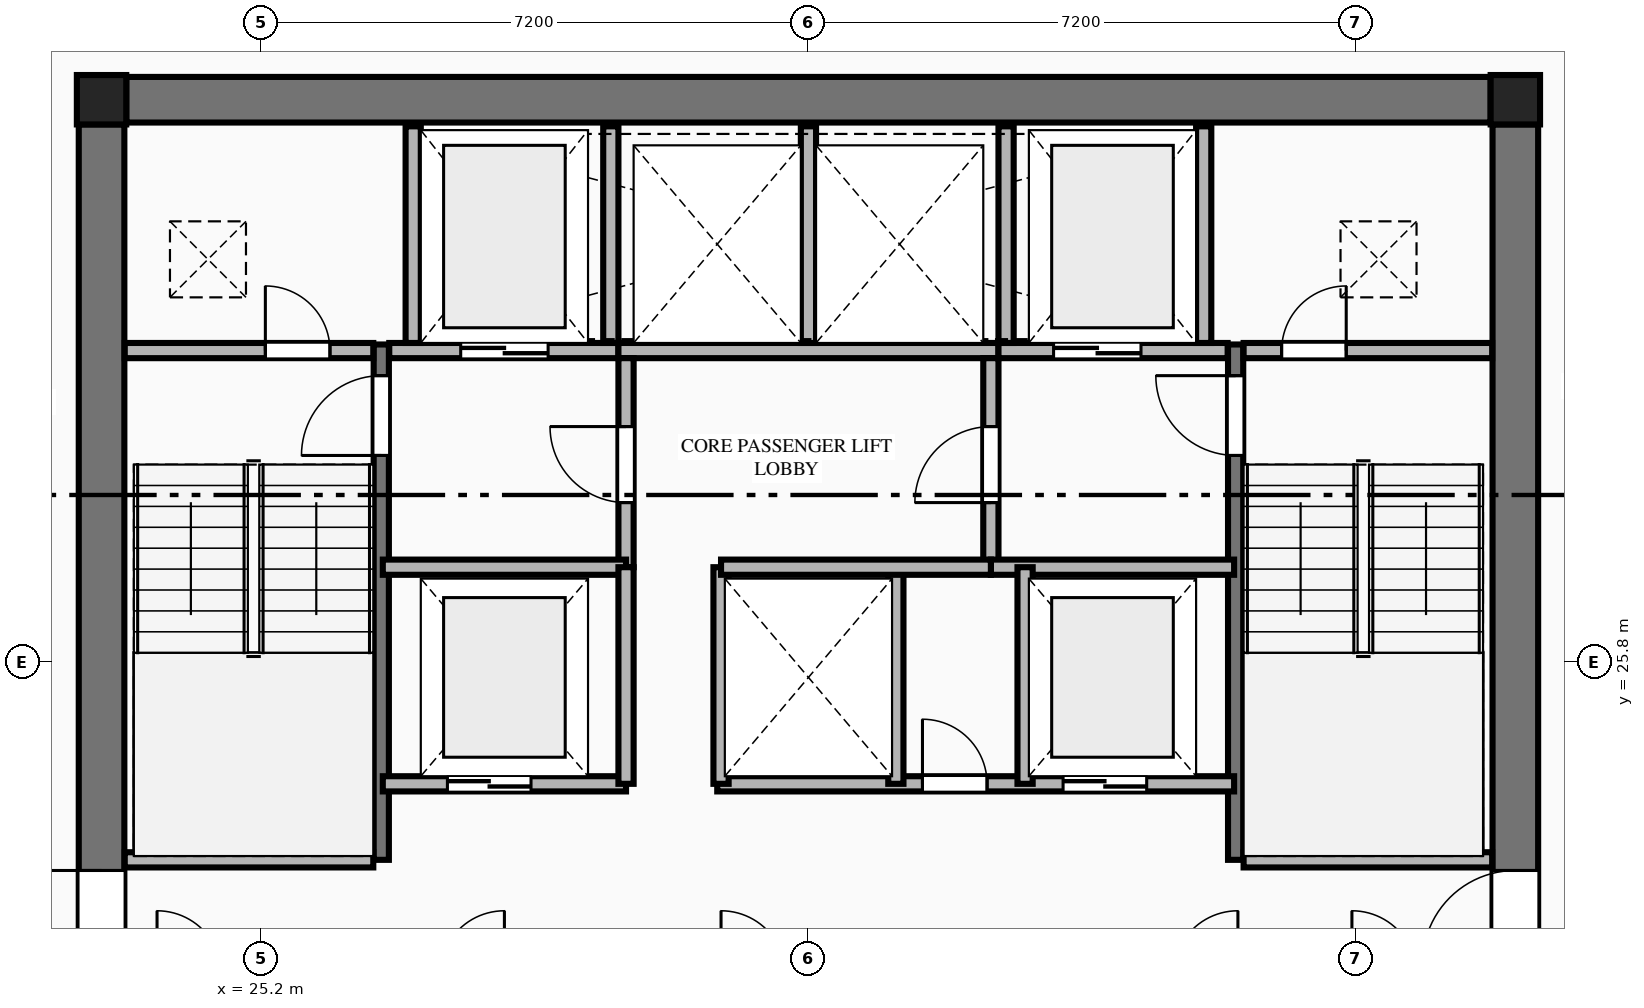
"""IFC4 building model, lengths in metres.
Left out: names, types, materials, properties, quantities, classifications, styles, units other than length and angle.
Written with IfcOpenShell. Run it as: python <this file> out.ifc"""

import sys

from ifc_helpers import new_model, si_unit, direction, frame, frame_2d, origin, origin_2d, place, context, subcontext, project, spatial, rectangle, extrude, element, fill, save


model = new_model("IFC4")
c1 = context("Model", 3, precision=1e-05, world=origin(), true_north=direction((0.0, 1.0)))
c2 = subcontext(c1, "Body", "Model", "MODEL_VIEW")
j1 = project(units=[si_unit("LENGTHUNIT", "METRE"), si_unit("PLANEANGLEUNIT", "RADIAN")], contexts=[c1])
p1 = place(None, origin())
s1 = spatial("IfcSite", under=j1, at=p1, CompositionType="ELEMENT")
p2 = place(p1, origin())
s2 = spatial("IfcBuilding", under=s1, at=p2, CompositionType="ELEMENT")
p3 = place(p2, frame((0.0, 0.0, 164.15)))
s3 = spatial("IfcBuildingStorey", under=s2, at=p3, CompositionType="ELEMENT", Elevation=164.15)
for number, where, z_axis, x_axis in (
    (1, (41.7, 33.2, 0.0), (0.0, 0.0, 1.0), (1.0, 0.0, 0.0)),
    (2, (23.1, 33.2, 0.0), (0.0, 0.0, 1.0), (1.0, 0.0, 0.0)),
):
    element("IfcColumn", number, at=place(p3, frame(where, z_axis=z_axis, x_axis=x_axis)), inside=s3, PredefinedType="COLUMN", context=c2, shape_type="SweptSolid", body=[
        extrude(rectangle(XDim=0.65, YDim=0.65, at=origin_2d()), origin(), (0.0, 0.0, 1.0), 3.55),
    ])
p4 = place(p3, frame((23.425, 33.2, 0.0), z_axis=(0.0, 0.0, 1.0), x_axis=(1.0, 0.0, 0.0)))
e3 = element("IfcWall", 3, at=p4, inside=s3, PredefinedType="SHEAR", context=c2, shape_type="SweptSolid", body=[
    extrude(rectangle(XDim=17.95, YDim=0.6, at=frame_2d((8.975, 0.0))), origin(), (0.0, 0.0, 1.0), 3.34),
])
p5 = place(p3, frame((23.1, 18.925, 0.0), z_axis=(0.0, 0.0, 1.0), x_axis=(0.0, 1.0, 0.0)))
e4 = element("IfcWall", 4, at=p5, inside=s3, PredefinedType="SHEAR", context=c2, shape_type="SweptSolid", body=[
    extrude(rectangle(XDim=13.95, YDim=0.6, at=frame_2d((6.975, 0.0))), origin(), (0.0, 0.0, 1.0), 3.34),
])
p6 = place(p5, frame((2.915, 0.0, 0.0)))
e5 = element("IfcOpeningElement", 5, at=p6, cuts=e4, PredefinedType="OPENING", context=c2, shape_type="SweptSolid", body=[
    extrude(rectangle(XDim=1.22, YDim=2.25, at=frame_2d((0.61, 1.125))), frame((0.0, 0.31, 0.0), z_axis=(0.0, -1.0, 0.0), x_axis=(1.0, 0.0, 0.0)), (0.0, 0.0, 1.0), 0.62),
])
p7 = place(p3, frame((41.7, 18.925, 0.0), z_axis=(0.0, 0.0, 1.0), x_axis=(0.0, 1.0, 0.0)))
e6 = element("IfcWall", 6, at=p7, inside=s3, PredefinedType="SHEAR", context=c2, shape_type="SweptSolid", body=[
    extrude(rectangle(XDim=13.95, YDim=0.6, at=frame_2d((6.975, 0.0))), origin(), (0.0, 0.0, 1.0), 3.34),
])
p8 = place(p7, frame((2.915, 0.0, 0.0)))
e7 = element("IfcOpeningElement", 7, at=p8, cuts=e6, PredefinedType="OPENING", context=c2, shape_type="SweptSolid", body=[
    extrude(rectangle(XDim=1.22, YDim=2.25, at=frame_2d((0.61, 1.125))), frame((0.0, 0.31, 0.0), z_axis=(0.0, -1.0, 0.0), x_axis=(1.0, 0.0, 0.0)), (0.0, 0.0, 1.0), 0.62),
])
p9 = place(p3, frame((26.78, 23.2, 0.0), z_axis=(0.0, 0.0, 1.0), x_axis=(0.0, 1.0, 0.0)))
e8 = element("IfcWall", 8, at=p9, inside=s3, PredefinedType="SHEAR", context=c2, shape_type="SweptSolid", body=[
    extrude(rectangle(XDim=6.78, YDim=0.2, at=frame_2d((3.39, 0.0))), origin(), (0.0, 0.0, 1.0), 3.55),
])
p10 = place(p9, frame((5.32, 0.0, 0.0)))
e9 = element("IfcOpeningElement", 9, at=p10, cuts=e8, PredefinedType="OPENING", context=c2, shape_type="SweptSolid", body=[
    extrude(rectangle(XDim=1.05, YDim=2.15, at=frame_2d((0.525, 1.075))), frame((0.0, 0.11, 0.0), z_axis=(0.0, -1.0, 0.0), x_axis=(1.0, 0.0, 0.0)), (0.0, 0.0, 1.0), 0.22),
])
p11 = place(p3, frame((23.405, 23.2, 0.0), z_axis=(0.0, 0.0, 1.0), x_axis=(1.0, 0.0, 0.0)))
e10 = element("IfcWall", 10, at=p11, inside=s3, PredefinedType="PLUMBINGWALL", context=c2, shape_type="SweptSolid", body=[
    extrude(rectangle(XDim=3.27, YDim=0.2, at=frame_2d((1.635, 0.0))), origin(), (0.0, 0.0, 1.0), 3.34),
])
p12 = place(p3, frame((38.02, 23.2, 0.0), z_axis=(0.0, 0.0, 1.0), x_axis=(0.0, 1.0, 0.0)))
e11 = element("IfcWall", 11, at=p12, inside=s3, PredefinedType="SHEAR", context=c2, shape_type="SweptSolid", body=[
    extrude(rectangle(XDim=6.78, YDim=0.2, at=frame_2d((3.39, 0.0))), origin(), (0.0, 0.0, 1.0), 3.55),
])
p13 = place(p12, frame((5.32, 0.0, 0.0)))
e12 = element("IfcOpeningElement", 12, at=p13, cuts=e11, PredefinedType="OPENING", context=c2, shape_type="SweptSolid", body=[
    extrude(rectangle(XDim=1.05, YDim=2.15, at=frame_2d((0.525, 1.075))), frame((0.0, 0.11, 0.0), z_axis=(0.0, -1.0, 0.0), x_axis=(1.0, 0.0, 0.0)), (0.0, 0.0, 1.0), 0.22),
])
p14 = place(p3, frame((38.125, 23.2, 0.0), z_axis=(0.0, 0.0, 1.0), x_axis=(1.0, 0.0, 0.0)))
e13 = element("IfcWall", 13, at=p14, inside=s3, PredefinedType="PLUMBINGWALL", context=c2, shape_type="SweptSolid", body=[
    extrude(rectangle(XDim=3.27, YDim=0.2, at=frame_2d((1.635, 0.0))), origin(), (0.0, 0.0, 1.0), 3.34),
])
p15 = place(p3, frame((23.405, 29.9, 0.0), z_axis=(0.0, 0.0, 1.0), x_axis=(1.0, 0.0, 0.0)))
e14 = element("IfcWall", 14, at=p15, inside=s3, PredefinedType="PLUMBINGWALL", context=c2, shape_type="SweptSolid", body=[
    extrude(rectangle(XDim=3.27, YDim=0.2, at=frame_2d((1.635, 0.0))), origin(), (0.0, 0.0, 1.0), 3.34),
])
p16 = place(p15, frame((1.85, 0.0, 0.0)))
e15 = element("IfcOpeningElement", 15, at=p16, cuts=e14, PredefinedType="OPENING", context=c2, shape_type="SweptSolid", body=[
    extrude(rectangle(XDim=0.85, YDim=2.05, at=frame_2d((0.425, 1.025))), frame((0.0, 0.11, 0.0), z_axis=(0.0, -1.0, 0.0), x_axis=(1.0, 0.0, 0.0)), (0.0, 0.0, 1.0), 0.22),
])
p17 = place(p3, frame((26.885, 29.9, 0.0), z_axis=(0.0, 0.0, 1.0), x_axis=(1.0, 0.0, 0.0)))
e16 = element("IfcWall", 16, at=p17, inside=s3, PredefinedType="PLUMBINGWALL", context=c2, shape_type="SweptSolid", body=[
    extrude(rectangle(XDim=3.015, YDim=0.2, at=frame_2d((1.507, 0.0))), origin(), (0.0, 0.0, 1.0), 3.34),
])
p18 = place(p17, frame((0.94, 0.0, 0.0)))
e17 = element("IfcOpeningElement", 17, at=p18, cuts=e16, PredefinedType="OPENING", context=c2, shape_type="SweptSolid", body=[
    extrude(rectangle(XDim=1.15, YDim=2.2, at=frame_2d((0.575, 1.1))), frame((0.0, 0.11, 0.0), z_axis=(0.0, -1.0, 0.0), x_axis=(1.0, 0.0, 0.0)), (0.0, 0.0, 1.0), 0.22),
])
p19 = place(p3, frame((29.9, 29.9, 0.0), z_axis=(0.0, 0.0, 1.0), x_axis=(1.0, 0.0, 0.0)))
e18 = element("IfcWall", 18, at=p19, inside=s3, PredefinedType="PLUMBINGWALL", context=c2, shape_type="SweptSolid", body=[
    extrude(rectangle(XDim=5.0, YDim=0.2, at=frame_2d((2.5, 0.0))), origin(), (0.0, 0.0, 1.0), 3.34),
])
p20 = place(p3, frame((34.9, 29.9, 0.0), z_axis=(0.0, 0.0, 1.0), x_axis=(1.0, 0.0, 0.0)))
e19 = element("IfcWall", 19, at=p20, inside=s3, PredefinedType="PLUMBINGWALL", context=c2, shape_type="SweptSolid", body=[
    extrude(rectangle(XDim=3.015, YDim=0.2, at=frame_2d((1.508, 0.0))), origin(), (0.0, 0.0, 1.0), 3.34),
])
p21 = place(p20, frame((0.725, 0.0, 0.0)))
e20 = element("IfcOpeningElement", 20, at=p21, cuts=e19, PredefinedType="OPENING", context=c2, shape_type="SweptSolid", body=[
    extrude(rectangle(XDim=1.15, YDim=2.2, at=frame_2d((0.575, 1.1))), frame((0.0, 0.11, 0.0), z_axis=(0.0, -1.0, 0.0), x_axis=(1.0, 0.0, 0.0)), (0.0, 0.0, 1.0), 0.22),
])
p22 = place(p3, frame((38.125, 29.9, 0.0), z_axis=(0.0, 0.0, 1.0), x_axis=(1.0, 0.0, 0.0)))
e21 = element("IfcWall", 21, at=p22, inside=s3, PredefinedType="PLUMBINGWALL", context=c2, shape_type="SweptSolid", body=[
    extrude(rectangle(XDim=3.27, YDim=0.2, at=frame_2d((1.635, 0.0))), origin(), (0.0, 0.0, 1.0), 3.34),
])
p23 = place(p22, frame((0.5, 0.0, 0.0)))
e22 = element("IfcOpeningElement", 22, at=p23, cuts=e21, PredefinedType="OPENING", context=c2, shape_type="SweptSolid", body=[
    extrude(rectangle(XDim=0.85, YDim=2.05, at=frame_2d((0.425, 1.025))), frame((0.0, 0.11, 0.0), z_axis=(0.0, -1.0, 0.0), x_axis=(1.0, 0.0, 0.0)), (0.0, 0.0, 1.0), 0.22),
])
for number, where, z_axis, x_axis in (
    (23, (27.2, 30.0, 0.0), (0.0, 0.0, 1.0), (0.0, 1.0, 0.0)),
    (24, (29.8, 30.0, 0.0), (0.0, 0.0, 1.0), (0.0, 1.0, 0.0)),
    (25, (32.4, 30.0, 0.0), (0.0, 0.0, 1.0), (0.0, 1.0, 0.0)),
    (26, (35.0, 30.0, 0.0), (0.0, 0.0, 1.0), (0.0, 1.0, 0.0)),
    (27, (37.6, 30.0, 0.0), (0.0, 0.0, 1.0), (0.0, 1.0, 0.0)),
):
    element("IfcWall", number, at=place(p3, frame(where, z_axis=z_axis, x_axis=x_axis)), inside=s3, PredefinedType="PLUMBINGWALL", context=c2, shape_type="SweptSolid", body=[
        extrude(rectangle(XDim=2.85, YDim=0.2, at=frame_2d((1.425, 0.0))), origin(), (0.0, 0.0, 1.0), 3.34),
    ])
p24 = place(p3, frame((30.0, 27.05, 0.0), z_axis=(0.0, 0.0, 1.0), x_axis=(0.0, 1.0, 0.0)))
e28 = element("IfcWall", 28, at=p24, inside=s3, PredefinedType="PLUMBINGWALL", context=c2, shape_type="SweptSolid", body=[
    extrude(rectangle(XDim=2.75, YDim=0.2, at=frame_2d((1.375, 0.0))), origin(), (0.0, 0.0, 1.0), 3.34),
])
p25 = place(p24, frame((0.85, 0.0, 0.0)))
e29 = element("IfcOpeningElement", 29, at=p25, cuts=e28, PredefinedType="OPENING", context=c2, shape_type="SweptSolid", body=[
    extrude(rectangle(XDim=1.0, YDim=2.15, at=frame_2d((0.5, 1.075))), frame((0.0, 0.11, 0.0), z_axis=(0.0, -1.0, 0.0), x_axis=(1.0, 0.0, 0.0)), (0.0, 0.0, 1.0), 0.22),
])
p26 = place(p3, frame((26.8, 27.05, 0.0), z_axis=(0.0, 0.0, 1.0), x_axis=(1.0, 0.0, 0.0)))
e30 = element("IfcWall", 30, at=p26, inside=s3, PredefinedType="PLUMBINGWALL", context=c2, shape_type="SweptSolid", body=[
    extrude(rectangle(XDim=3.2, YDim=0.2, at=frame_2d((1.6, 0.0))), origin(), (0.0, 0.0, 1.0), 3.34),
])
p27 = place(p3, frame((34.8, 27.05, 0.0), z_axis=(0.0, 0.0, 1.0), x_axis=(0.0, 1.0, 0.0)))
e31 = element("IfcWall", 31, at=p27, inside=s3, PredefinedType="PLUMBINGWALL", context=c2, shape_type="SweptSolid", body=[
    extrude(rectangle(XDim=2.75, YDim=0.2, at=frame_2d((1.375, 0.0))), origin(), (0.0, 0.0, 1.0), 3.34),
])
p28 = place(p27, frame((0.85, 0.0, 0.0)))
e32 = element("IfcOpeningElement", 32, at=p28, cuts=e31, PredefinedType="OPENING", context=c2, shape_type="SweptSolid", body=[
    extrude(rectangle(XDim=1.0, YDim=2.15, at=frame_2d((0.5, 1.075))), frame((0.0, 0.11, 0.0), z_axis=(0.0, -1.0, 0.0), x_axis=(1.0, 0.0, 0.0)), (0.0, 0.0, 1.0), 0.22),
])
p29 = place(p3, frame((34.8, 27.05, 0.0), z_axis=(0.0, 0.0, 1.0), x_axis=(1.0, 0.0, 0.0)))
e33 = element("IfcWall", 33, at=p29, inside=s3, PredefinedType="PLUMBINGWALL", context=c2, shape_type="SweptSolid", body=[
    extrude(rectangle(XDim=3.2, YDim=0.2, at=frame_2d((1.6, 0.0))), origin(), (0.0, 0.0, 1.0), 3.34),
])
p30 = place(p3, frame((26.8, 24.2, 0.0), z_axis=(0.0, 0.0, 1.0), x_axis=(1.0, 0.0, 0.0)))
e34 = element("IfcWall", 34, at=p30, inside=s3, PredefinedType="PLUMBINGWALL", context=c2, shape_type="SweptSolid", body=[
    extrude(rectangle(XDim=3.2, YDim=0.2, at=frame_2d((1.6, 0.0))), origin(), (0.0, 0.0, 1.0), 3.34),
])
p31 = place(p30, frame((0.85, 0.0, 0.0)))
e35 = element("IfcOpeningElement", 35, at=p31, cuts=e34, PredefinedType="OPENING", context=c2, shape_type="SweptSolid", body=[
    extrude(rectangle(XDim=1.1, YDim=2.2, at=frame_2d((0.55, 1.1))), frame((0.0, 0.11, 0.0), z_axis=(0.0, -1.0, 0.0), x_axis=(1.0, 0.0, 0.0)), (0.0, 0.0, 1.0), 0.22),
])
p32 = place(p3, frame((30.0, 24.2, 0.0), z_axis=(0.0, 0.0, 1.0), x_axis=(0.0, 1.0, 0.0)))
e36 = element("IfcWall", 36, at=p32, inside=s3, PredefinedType="PLUMBINGWALL", context=c2, shape_type="SweptSolid", body=[
    extrude(rectangle(XDim=2.85, YDim=0.2, at=frame_2d((1.425, 0.0))), origin(), (0.0, 0.0, 1.0), 3.34),
])
p33 = place(p3, frame((31.2, 24.2, 0.0), z_axis=(0.0, 0.0, 1.0), x_axis=(1.0, 0.0, 0.0)))
e37 = element("IfcWall", 37, at=p33, inside=s3, PredefinedType="PLUMBINGWALL", context=c2, shape_type="SweptSolid", body=[
    extrude(rectangle(XDim=6.8, YDim=0.2, at=frame_2d((3.4, 0.0))), origin(), (0.0, 0.0, 1.0), 3.34),
])
p34 = place(p33, frame((2.7, 0.0, 0.0)))
e38 = element("IfcOpeningElement", 38, at=p34, cuts=e37, PredefinedType="OPENING", context=c2, shape_type="SweptSolid", body=[
    extrude(rectangle(XDim=0.85, YDim=2.05, at=frame_2d((0.425, 1.025))), frame((0.0, 0.11, 0.0), z_axis=(0.0, -1.0, 0.0), x_axis=(1.0, 0.0, 0.0)), (0.0, 0.0, 1.0), 0.22),
])
p35 = place(p33, frame((4.55, 0.0, 0.0)))
e39 = element("IfcOpeningElement", 39, at=p35, cuts=e37, PredefinedType="OPENING", context=c2, shape_type="SweptSolid", body=[
    extrude(rectangle(XDim=1.1, YDim=2.2, at=frame_2d((0.55, 1.1))), frame((0.0, 0.11, 0.0), z_axis=(0.0, -1.0, 0.0), x_axis=(1.0, 0.0, 0.0)), (0.0, 0.0, 1.0), 0.22),
])
for number, where, z_axis, x_axis in (
    (40, (31.25, 24.2, 0.0), (0.0, 0.0, 1.0), (0.0, 1.0, 0.0)),
    (41, (33.55, 24.2, 0.0), (0.0, 0.0, 1.0), (0.0, 1.0, 0.0)),
    (42, (35.25, 24.2, 0.0), (0.0, 0.0, 1.0), (0.0, 1.0, 0.0)),
):
    element("IfcWall", number, at=place(p3, frame(where, z_axis=z_axis, x_axis=x_axis)), inside=s3, PredefinedType="PLUMBINGWALL", context=c2, shape_type="SweptSolid", body=[
        extrude(rectangle(XDim=2.85, YDim=0.2, at=frame_2d((1.425, 0.0))), origin(), (0.0, 0.0, 1.0), 3.34),
    ])
p36 = place(p3, frame((31.25, 27.05, 0.0), z_axis=(0.0, 0.0, 1.0), x_axis=(1.0, 0.0, 0.0)))
e43 = element("IfcWall", 43, at=p36, inside=s3, PredefinedType="PLUMBINGWALL", context=c2, shape_type="SweptSolid", body=[
    extrude(rectangle(XDim=3.55, YDim=0.2, at=frame_2d((1.775, 0.0))), origin(), (0.0, 0.0, 1.0), 3.34),
])
p37 = place(p6, origin())
e44 = element("IfcDoor", 44, at=p37, inside=s3, OperationType="SINGLE_SWING_RIGHT", PredefinedType="DOOR", context=c2, shape_type="SweptSolid", body=[
    extrude(rectangle(XDim=1.22, YDim=2.25, at=frame_2d((0.61, 1.125))), frame((0.0, 0.025, 0.0), z_axis=(0.0, -1.0, 0.0), x_axis=(1.0, 0.0, 0.0)), (0.0, 0.0, 1.0), 0.05),
])
fill(e5, e44)
p38 = place(p8, origin())
e45 = element("IfcDoor", 45, at=p38, inside=s3, OperationType="SINGLE_SWING_LEFT", PredefinedType="DOOR", context=c2, shape_type="SweptSolid", body=[
    extrude(rectangle(XDim=1.22, YDim=2.25, at=frame_2d((0.61, 1.125))), frame((0.0, 0.025, 0.0), z_axis=(0.0, -1.0, 0.0), x_axis=(1.0, 0.0, 0.0)), (0.0, 0.0, 1.0), 0.05),
])
fill(e7, e45)
p39 = place(p10, origin())
e46 = element("IfcDoor", 46, at=p39, inside=s3, OperationType="SINGLE_SWING_LEFT", PredefinedType="DOOR", context=c2, shape_type="SweptSolid", body=[
    extrude(rectangle(XDim=1.05, YDim=2.15, at=frame_2d((0.525, 1.075))), frame((0.0, 0.025, 0.0), z_axis=(0.0, -1.0, 0.0), x_axis=(1.0, 0.0, 0.0)), (0.0, 0.0, 1.0), 0.05),
])
fill(e9, e46)
p40 = place(p13, origin())
e47 = element("IfcDoor", 47, at=p40, inside=s3, OperationType="SINGLE_SWING_RIGHT", PredefinedType="DOOR", context=c2, shape_type="SweptSolid", body=[
    extrude(rectangle(XDim=1.05, YDim=2.15, at=frame_2d((0.525, 1.075))), frame((0.0, 0.025, 0.0), z_axis=(0.0, -1.0, 0.0), x_axis=(1.0, 0.0, 0.0)), (0.0, 0.0, 1.0), 0.05),
])
fill(e12, e47)
p41 = place(p16, origin())
e48 = element("IfcDoor", 48, at=p41, inside=s3, OperationType="SINGLE_SWING_LEFT", PredefinedType="DOOR", context=c2, shape_type="SweptSolid", body=[
    extrude(rectangle(XDim=0.85, YDim=2.05, at=frame_2d((0.425, 1.025))), frame((0.0, 0.025, 0.0), z_axis=(0.0, -1.0, 0.0), x_axis=(1.0, 0.0, 0.0)), (0.0, 0.0, 1.0), 0.05),
])
fill(e15, e48)
p42 = place(p23, origin())
e49 = element("IfcDoor", 49, at=p42, inside=s3, OperationType="SINGLE_SWING_RIGHT", PredefinedType="DOOR", context=c2, shape_type="SweptSolid", body=[
    extrude(rectangle(XDim=0.85, YDim=2.05, at=frame_2d((0.425, 1.025))), frame((0.0, 0.025, 0.0), z_axis=(0.0, -1.0, 0.0), x_axis=(1.0, 0.0, 0.0)), (0.0, 0.0, 1.0), 0.05),
])
fill(e22, e49)
p43 = place(p18, origin())
e50 = element("IfcDoor", 50, at=p43, inside=s3, OperationType="DOUBLE_DOOR_SLIDING", PredefinedType="DOOR", context=c2, shape_type="SweptSolid", body=[
    extrude(rectangle(XDim=1.15, YDim=2.2, at=frame_2d((0.575, 1.1))), frame((0.0, 0.025, 0.0), z_axis=(0.0, -1.0, 0.0), x_axis=(1.0, 0.0, 0.0)), (0.0, 0.0, 1.0), 0.05),
])
fill(e17, e50)
p44 = place(p21, origin())
e51 = element("IfcDoor", 51, at=p44, inside=s3, OperationType="DOUBLE_DOOR_SLIDING", PredefinedType="DOOR", context=c2, shape_type="SweptSolid", body=[
    extrude(rectangle(XDim=1.15, YDim=2.2, at=frame_2d((0.575, 1.1))), frame((0.0, 0.025, 0.0), z_axis=(0.0, -1.0, 0.0), x_axis=(1.0, 0.0, 0.0)), (0.0, 0.0, 1.0), 0.05),
])
fill(e20, e51)
p45 = place(p25, origin())
e52 = element("IfcDoor", 52, at=p45, inside=s3, OperationType="SINGLE_SWING_RIGHT", PredefinedType="DOOR", context=c2, shape_type="SweptSolid", body=[
    extrude(rectangle(XDim=1.0, YDim=2.15, at=frame_2d((0.5, 1.075))), frame((0.0, 0.025, 0.0), z_axis=(0.0, -1.0, 0.0), x_axis=(1.0, 0.0, 0.0)), (0.0, 0.0, 1.0), 0.05),
])
fill(e29, e52)
p46 = place(p28, origin())
e53 = element("IfcDoor", 53, at=p46, inside=s3, OperationType="SINGLE_SWING_LEFT", PredefinedType="DOOR", context=c2, shape_type="SweptSolid", body=[
    extrude(rectangle(XDim=1.0, YDim=2.15, at=frame_2d((0.5, 1.075))), frame((0.0, 0.025, 0.0), z_axis=(0.0, -1.0, 0.0), x_axis=(1.0, 0.0, 0.0)), (0.0, 0.0, 1.0), 0.05),
])
fill(e32, e53)
p47 = place(p31, origin())
e54 = element("IfcDoor", 54, at=p47, inside=s3, OperationType="DOUBLE_DOOR_SLIDING", PredefinedType="DOOR", context=c2, shape_type="SweptSolid", body=[
    extrude(rectangle(XDim=1.1, YDim=2.2, at=frame_2d((0.55, 1.1))), frame((0.0, 0.025, 0.0), z_axis=(0.0, -1.0, 0.0), x_axis=(1.0, 0.0, 0.0)), (0.0, 0.0, 1.0), 0.05),
])
fill(e35, e54)
p48 = place(p34, origin())
e55 = element("IfcDoor", 55, at=p48, inside=s3, OperationType="SINGLE_SWING_LEFT", PredefinedType="DOOR", context=c2, shape_type="SweptSolid", body=[
    extrude(rectangle(XDim=0.85, YDim=2.05, at=frame_2d((0.425, 1.025))), frame((0.0, 0.025, 0.0), z_axis=(0.0, -1.0, 0.0), x_axis=(1.0, 0.0, 0.0)), (0.0, 0.0, 1.0), 0.05),
])
fill(e38, e55)
p49 = place(p35, origin())
e56 = element("IfcDoor", 56, at=p49, inside=s3, OperationType="DOUBLE_DOOR_SLIDING", PredefinedType="DOOR", context=c2, shape_type="SweptSolid", body=[
    extrude(rectangle(XDim=1.1, YDim=2.2, at=frame_2d((0.55, 1.1))), frame((0.0, 0.025, 0.0), z_axis=(0.0, -1.0, 0.0), x_axis=(1.0, 0.0, 0.0)), (0.0, 0.0, 1.0), 0.05),
])
fill(e39, e56)
save(model, sys.argv[1])
